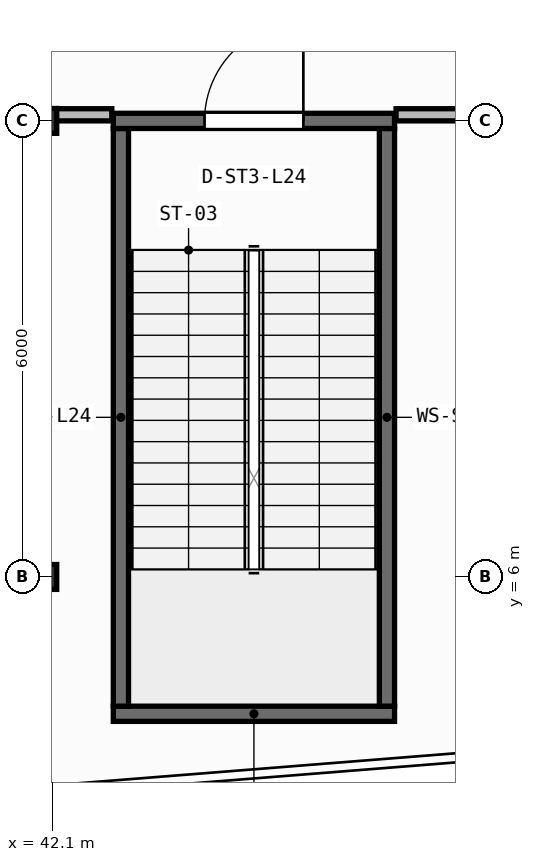
"""IFC4 building model, lengths in metres.
Left out: names, types, materials, properties, quantities, classifications, styles, units other than length and angle.
Written with IfcOpenShell. Run it as: python <this file> out.ifc"""

import sys

from ifc_helpers import new_model, si_unit, direction, frame, frame_2d, origin, origin_2d, place, context, subcontext, project, spatial, rectangle, i_section, extrude, element, fill, save


model = new_model("IFC4")
c1 = context("Model", 3, precision=1e-05, world=origin(), true_north=direction((0.0, 1.0)))
c2 = subcontext(c1, "Body", "Model", "MODEL_VIEW")
j1 = project(units=[si_unit("LENGTHUNIT", "METRE"), si_unit("PLANEANGLEUNIT", "RADIAN")], contexts=[c1])
p1 = place(None, origin())
s1 = spatial("IfcSite", under=j1, at=p1, CompositionType="ELEMENT")
p2 = place(p1, origin())
s2 = spatial("IfcBuilding", under=s1, at=p2, CompositionType="ELEMENT")
p3 = place(p2, frame((0.0, 0.0, 97.55)))
s3 = spatial("IfcBuildingStorey", under=s2, at=p3, CompositionType="ELEMENT", Elevation=97.55)
for number, where, z_axis, x_axis in (
    (1, (42.0, 6.0, 0.0), (0.0, 0.0, 1.0), (1.0, 0.0, 0.0)),
    (2, (42.0, 12.0, 0.0), (0.0, 0.0, 1.0), (1.0, 0.0, 0.0)),
):
    element("IfcColumn", number, at=place(p3, frame(where, z_axis=z_axis, x_axis=x_axis)), inside=s3, PredefinedType="COLUMN", context=c2, shape_type="SweptSolid", body=[
        extrude(i_section(OverallWidth=0.311, OverallDepth=0.327, WebThickness=0.016, FlangeThickness=0.025, FilletRadius=0.017, at=origin_2d()), origin(), (0.0, 0.0, 1.0), 5.8),
    ])
p4 = place(p3, frame((42.9, 4.2, 0.0), z_axis=(0.0, 0.0, 1.0), x_axis=(1.0, 0.0, 0.0)))
e3 = element("IfcWall", 3, at=p4, inside=s3, PredefinedType="SHEAR", context=c2, shape_type="SweptSolid", body=[
    extrude(rectangle(XDim=3.7, YDim=0.2, at=frame_2d((1.85, 0.0))), origin(), (0.0, 0.0, 1.0), 5.56),
])
for number, where, z_axis, x_axis in (
    (4, (43.0, 4.3, 0.0), (0.0, 0.0, 1.0), (0.0, 1.0, 0.0)),
    (5, (46.5, 4.3, 0.0), (0.0, 0.0, 1.0), (0.0, 1.0, 0.0)),
):
    element("IfcWall", number, at=place(p3, frame(where, z_axis=z_axis, x_axis=x_axis)), inside=s3, PredefinedType="SHEAR", context=c2, shape_type="SweptSolid", body=[
        extrude(rectangle(XDim=7.6, YDim=0.2, at=frame_2d((3.8, 0.0))), origin(), (0.0, 0.0, 1.0), 5.56),
    ])
p5 = place(p3, frame((42.9, 12.0, 0.0), z_axis=(0.0, 0.0, 1.0), x_axis=(1.0, 0.0, 0.0)))
e6 = element("IfcWall", 6, at=p5, inside=s3, PredefinedType="SHEAR", context=c2, shape_type="SweptSolid", body=[
    extrude(rectangle(XDim=3.7, YDim=0.2, at=frame_2d((1.85, 0.0))), origin(), (0.0, 0.0, 1.0), 5.56),
])
p6 = place(p5, frame((1.2, 0.0, 0.0)))
e7 = element("IfcOpeningElement", 7, at=p6, cuts=e6, PredefinedType="OPENING", context=c2, shape_type="SweptSolid", body=[
    extrude(rectangle(XDim=1.3, YDim=2.15, at=frame_2d((0.65, 1.075))), frame((0.0, 0.11, 0.0), z_axis=(0.0, -1.0, 0.0), x_axis=(1.0, 0.0, 0.0)), (0.0, 0.0, 1.0), 0.22),
])
p7 = place(p3, frame((31.52, 12.08, 0.0), z_axis=(0.0, 0.0, 1.0), x_axis=(1.0, 0.0, 0.0)))
e8 = element("IfcWall", 8, at=p7, inside=s3, PredefinedType="PARTITIONING", context=c2, shape_type="SweptSolid", body=[
    extrude(rectangle(XDim=11.36, YDim=0.16, at=frame_2d((5.68, 0.0))), origin(), (0.0, 0.0, 1.0), 4.835),
])
p8 = place(p3, frame((46.62, 12.08, 0.0), z_axis=(0.0, 0.0, 1.0), x_axis=(1.0, 0.0, 0.0)))
e9 = element("IfcWall", 9, at=p8, inside=s3, PredefinedType="PARTITIONING", context=c2, shape_type="SweptSolid", body=[
    extrude(rectangle(XDim=9.06, YDim=0.16, at=frame_2d((4.53, 0.0))), origin(), (0.0, 0.0, 1.0), 4.835),
])
p9 = place(p6, origin())
e10 = element("IfcDoor", 10, at=p9, inside=s3, OperationType="SINGLE_SWING_RIGHT", PredefinedType="DOOR", context=c2, shape_type="SweptSolid", body=[
    extrude(rectangle(XDim=1.3, YDim=2.15, at=frame_2d((0.65, 1.075))), frame((0.0, 0.025, 0.0), z_axis=(0.0, -1.0, 0.0), x_axis=(1.0, 0.0, 0.0)), (0.0, 0.0, 1.0), 0.05),
])
fill(e7, e10)
save(model, sys.argv[1])
